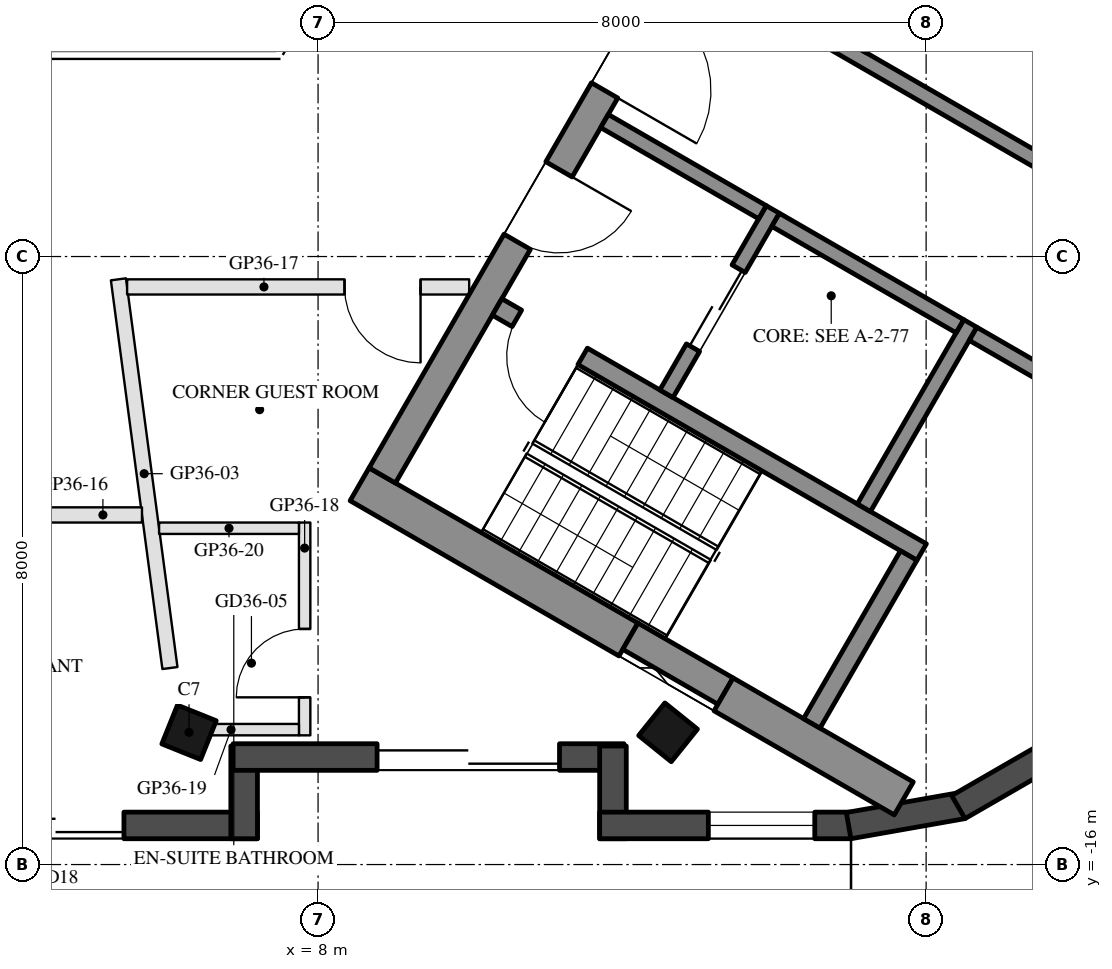
"""IFC4 building model, lengths in metres.
Left out: names, types, materials, properties, quantities, classifications, styles, units other than length and angle.
Written with IfcOpenShell. Run it as: python <this file> out.ifc"""

import sys

from ifc_helpers import new_model, si_unit, direction, frame, frame_2d, origin, origin_2d, place, context, subcontext, project, spatial, rectangle, hollow_rectangle, extrude, boolean, halfspace, element, fill, save


model = new_model("IFC4")
c1 = context("Model", 3, precision=1e-05, world=origin(), true_north=direction((0.0, 1.0)))
c2 = subcontext(c1, "Body", "Model", "MODEL_VIEW")
j1 = project(units=[si_unit("LENGTHUNIT", "METRE"), si_unit("PLANEANGLEUNIT", "RADIAN")], contexts=[c1])
p1 = place(None, origin())
s1 = spatial("IfcSite", under=j1, at=p1, CompositionType="ELEMENT")
p2 = place(p1, origin())
s2 = spatial("IfcBuilding", under=s1, at=p2, CompositionType="ELEMENT")
p3 = place(p2, frame((0.0, 0.0, 328.1)))
s3 = spatial("IfcBuildingStorey", under=s2, at=p3, CompositionType="ELEMENT", Elevation=328.1)
p4 = place(p3, frame((6.302, -14.26, 0.0), z_axis=(-0.060870463553, 0.151232178432, 0.986622326361), x_axis=(0.99813528898, 0.004713590867, 0.06085825296)))
e1 = element("IfcColumn", 1, at=p4, inside=s3, PredefinedType="COLUMN", context=c2, shape_type="SweptSolid", body=[
    boolean("DIFFERENCE", boolean("DIFFERENCE", extrude(hollow_rectangle(XDim=0.55, YDim=0.55, WallThickness=0.025, at=origin_2d()), origin(), (0.0, 0.0, 1.0), 3.75), halfspace(frame((0.0, 0.0, 0.034), z_axis=(0.0, 0.0, 1.0), x_axis=(1.0, 0.0, 0.0)), True)), halfspace(frame((0.0, 0.0, 3.735), z_axis=(0.0, 0.0, 1.0), x_axis=(1.0, 0.0, 0.0)), False)),
])
p5 = place(p3, frame((12.605, -14.26, 0.0), z_axis=(-0.121069901949, 0.150398600122, 0.981184151892), x_axis=(0.992601568988, 0.00920533993, 0.121067695767)))
e2 = element("IfcColumn", 2, at=p5, inside=s3, PredefinedType="COLUMN", context=c2, shape_type="SweptSolid", body=[
    boolean("DIFFERENCE", boolean("DIFFERENCE", extrude(hollow_rectangle(XDim=0.55, YDim=0.55, WallThickness=0.025, at=origin_2d()), origin(), (0.0, 0.0, 1.0), 3.771), halfspace(frame((0.0, 0.0, 0.04), z_axis=(0.0, 0.0, 1.0), x_axis=(1.0, 0.0, 0.0)), True)), halfspace(frame((0.0, 0.0, 3.753), z_axis=(0.0, 0.0, 1.0), x_axis=(1.0, 0.0, 0.0)), False)),
])
p6 = place(p3, frame((18.77, -10.837, 0.0), z_axis=(-0.190346159062, 0.109881938965, 0.975548204457), x_axis=(0.499994868029, 0.866028366632, 1.1507946e-05)))
e3 = element("IfcColumn", 3, at=p6, inside=s3, PredefinedType="COLUMN", context=c2, shape_type="SweptSolid", body=[
    boolean("DIFFERENCE", boolean("DIFFERENCE", extrude(hollow_rectangle(XDim=2.0, YDim=2.0, WallThickness=0.05, at=origin_2d()), origin(), (0.0, 0.0, 1.0), 3.793), halfspace(frame((0.0, 0.0, 0.113), z_axis=(0.0, 0.0, 1.0), x_axis=(1.0, 0.0, 0.0)), True)), halfspace(frame((0.0, 0.0, 3.744), z_axis=(0.0, 0.0, 1.0), x_axis=(1.0, 0.0, 0.0)), False)),
])
p7 = place(p3, frame((-0.9, -15.485, 0.0), z_axis=(0.0, 0.0, 1.0), x_axis=(1.0, 0.0, 0.0)))
e4 = element("IfcWall", 4, at=p7, inside=s3, PredefinedType="SOLIDWALL", context=c2, shape_type="SweptSolid", body=[
    extrude(rectangle(XDim=8.102, YDim=0.35, at=frame_2d((4.051, 0.0))), origin(), (0.0, 0.0, 1.0), 3.45),
])
p8 = place(p7, frame((4.546, 0.0, 0.0)))
e5 = element("IfcOpeningElement", 5, at=p8, cuts=e4, PredefinedType="OPENING", context=c2, shape_type="SweptSolid", body=[
    extrude(rectangle(XDim=1.8, YDim=2.4, at=frame_2d((0.9, 1.2))), frame((0.0, 0.185, 0.0), z_axis=(0.0, -1.0, 0.0), x_axis=(1.0, 0.0, 0.0)), (0.0, 0.0, 1.0), 0.37),
])
p9 = place(p7, frame((2.65, 0.0, 0.3)))
e6 = element("IfcOpeningElement", 6, at=p9, cuts=e4, PredefinedType="OPENING", context=c2, shape_type="SweptSolid", body=[
    extrude(rectangle(XDim=1.5, YDim=2.65, at=frame_2d((0.75, 1.325))), frame((0.0, 0.185, 0.0), z_axis=(0.0, -1.0, 0.0), x_axis=(1.0, 0.0, 0.0)), (0.0, 0.0, 1.0), 0.37),
])
p10 = place(p3, frame((7.027, -15.66, 0.0), z_axis=(0.0, 0.0, 1.0), x_axis=(0.0, 1.0, 0.0)))
e7 = element("IfcWall", 7, at=p10, inside=s3, PredefinedType="SOLIDWALL", context=c2, shape_type="SweptSolid", body=[
    extrude(rectangle(XDim=1.22, YDim=0.35, at=frame_2d((0.61, 0.0))), origin(), (0.0, 0.0, 1.0), 3.45),
])
p11 = place(p3, frame((6.882, -14.585, 0.0), z_axis=(0.0, 0.0, 1.0), x_axis=(1.0, 0.0, 0.0)))
e8 = element("IfcWall", 8, at=p11, inside=s3, PredefinedType="SOLIDWALL", context=c2, shape_type="SweptSolid", body=[
    extrude(rectangle(XDim=5.143, YDim=0.35, at=frame_2d((2.571, 0.0))), origin(), (0.0, 0.0, 1.0), 3.45),
])
p12 = place(p11, frame((1.894, 0.0, 0.0)))
e9 = element("IfcOpeningElement", 9, at=p12, cuts=e8, PredefinedType="OPENING", context=c2, shape_type="SweptSolid", body=[
    extrude(rectangle(XDim=2.4, YDim=2.4, at=frame_2d((1.2, 1.2))), frame((0.0, 0.185, 0.0), z_axis=(0.0, -1.0, 0.0), x_axis=(1.0, 0.0, 0.0)), (0.0, 0.0, 1.0), 0.37),
])
p13 = place(p3, frame((11.88, -14.44, 0.0), z_axis=(0.0, 0.0, 1.0), x_axis=(0.0, -1.0, 0.0)))
e10 = element("IfcWall", 10, at=p13, inside=s3, PredefinedType="SOLIDWALL", context=c2, shape_type="SweptSolid", body=[
    extrude(rectangle(XDim=1.22, YDim=0.35, at=frame_2d((0.61, 0.0))), origin(), (0.0, 0.0, 1.0), 3.45),
])
p14 = place(p3, frame((11.705, -15.485, 0.0), z_axis=(0.0, 0.0, 1.0), x_axis=(1.0, 0.0, 0.0)))
e11 = element("IfcWall", 11, at=p14, inside=s3, PredefinedType="SOLIDWALL", context=c2, shape_type="SweptSolid", body=[
    extrude(rectangle(XDim=3.306, YDim=0.35, at=frame_2d((1.653, 0.0))), origin(), (0.0, 0.0, 1.0), 3.45),
])
p15 = place(p14, frame((1.43, 0.0, 0.3)))
e12 = element("IfcOpeningElement", 12, at=p15, cuts=e11, PredefinedType="OPENING", context=c2, shape_type="SweptSolid", body=[
    extrude(rectangle(XDim=1.4, YDim=2.65, at=frame_2d((0.7, 1.325))), frame((0.0, 0.185, 0.0), z_axis=(0.0, -1.0, 0.0), x_axis=(1.0, 0.0, 0.0)), (0.0, 0.0, 1.0), 0.37),
])
for number, where, z_axis, x_axis in (
    (13, (14.98, -15.488, 0.0), (0.0, 0.0, 1.0), (0.985, 0.174, 0.0)),
    (14, (16.424, -15.244, 0.0), (0.0, 0.0, 1.0), (0.866, 0.5, 0.0)),
):
    element("IfcWall", number, at=place(p3, frame(where, z_axis=z_axis, x_axis=x_axis)), inside=s3, PredefinedType="SOLIDWALL", context=c2, shape_type="SweptSolid", body=[
        extrude(rectangle(XDim=1.524, YDim=0.35, at=frame_2d((0.762, 0.0))), origin(), (0.0, 0.0, 1.0), 3.45),
    ])
p16 = place(p3, frame((20.916, -5.257, 0.0), z_axis=(0.0, 0.0, 1.0), x_axis=(-0.500022310942, 0.866012522173, 0.0)))
e15 = element("IfcWall", 15, at=p16, inside=s3, PredefinedType="SOLIDWALL", context=c2, shape_type="SweptSolid", body=[
    extrude(rectangle(XDim=9.608, YDim=0.35, at=frame_2d((4.804, 0.0))), origin(), (0.0, 0.0, 1.0), 3.45),
])
p17 = place(p16, frame((0.45, 0.0, 0.3)))
e16 = element("IfcOpeningElement", 16, at=p17, cuts=e15, PredefinedType="OPENING", context=c2, shape_type="SweptSolid", body=[
    extrude(rectangle(XDim=1.4, YDim=2.65, at=frame_2d((0.7, 1.325))), frame((0.0, 0.185, 0.0), z_axis=(0.0, -1.0, 0.0), x_axis=(1.0, 0.0, 0.0)), (0.0, 0.0, 1.0), 0.37),
])
p18 = place(p16, frame((5.68, 0.0, 0.0)))
e17 = element("IfcOpeningElement", 17, at=p18, cuts=e15, PredefinedType="OPENING", context=c2, shape_type="SweptSolid", body=[
    extrude(rectangle(XDim=2.4, YDim=2.4, at=frame_2d((1.2, 1.2))), frame((0.0, 0.185, 0.0), z_axis=(0.0, -1.0, 0.0), x_axis=(1.0, 0.0, 0.0)), (0.0, 0.0, 1.0), 0.37),
])
p19 = place(p16, frame((3.492, 0.0, 0.3)))
e18 = element("IfcOpeningElement", 18, at=p19, cuts=e15, PredefinedType="OPENING", context=c2, shape_type="SweptSolid", body=[
    extrude(rectangle(XDim=1.8, YDim=2.65, at=frame_2d((0.9, 1.325))), frame((0.0, 0.185, 0.0), z_axis=(0.0, -1.0, 0.0), x_axis=(1.0, 0.0, 0.0)), (0.0, 0.0, 1.0), 0.37),
])
p20 = place(p3, frame((8.547, -10.997, 0.0), z_axis=(0.0, 0.0, 1.0), x_axis=(0.866031306094, -0.49998977676, 0.0)))
e19 = element("IfcWall", 19, at=p20, inside=s3, PredefinedType="SHEAR", context=c2, shape_type="SweptSolid", body=[
    extrude(rectangle(XDim=4.084, YDim=0.5, at=frame_2d((2.042, 0.0))), origin(), (0.0, 0.0, 1.0), 3.45),
])
p21 = place(p3, frame((12.109, -12.996, 0.0), z_axis=(0.0, 0.0, 1.0), x_axis=(0.865977303747, -0.500083302456, 0.0)))
e20 = element("IfcWall", 20, at=p21, inside=s3, PredefinedType="SHEAR", context=c2, shape_type="SweptSolid", body=[
    extrude(rectangle(XDim=1.445, YDim=0.4, at=frame_2d((0.722, 0.0))), origin(), (0.0, 0.0, 1.0), 3.45),
])
p22 = place(p3, frame((13.335, -13.761, 0.0), z_axis=(0.0, 0.0, 1.0), x_axis=(0.866034122891, -0.49998489776, 0.0)))
e21 = element("IfcWall", 21, at=p22, inside=s3, PredefinedType="SHEAR", context=c2, shape_type="SweptSolid", body=[
    extrude(rectangle(XDim=2.738, YDim=0.5, at=frame_2d((1.369, 0.0))), origin(), (0.0, 0.0, 1.0), 3.45),
])
p23 = place(p3, frame((8.845, -10.88, 0.0), z_axis=(0.0, 0.0, 1.0), x_axis=(0.500004234368, 0.866022959057, 0.0)))
e22 = element("IfcWall", 22, at=p23, inside=s3, PredefinedType="SHEAR", context=c2, shape_type="SweptSolid", body=[
    extrude(rectangle(XDim=10.0, YDim=0.4, at=frame_2d((5.0, 0.0))), origin(), (0.0, 0.0, 1.0), 3.45),
])
p24 = place(p23, frame((3.55, 0.0, 0.0)))
e23 = element("IfcOpeningElement", 23, at=p24, cuts=e22, PredefinedType="OPENING", context=c2, shape_type="SweptSolid", body=[
    extrude(rectangle(XDim=1.1, YDim=2.1, at=frame_2d((0.55, 1.05))), frame((0.0, 0.21, 0.0), z_axis=(0.0, -1.0, 0.0), x_axis=(1.0, 0.0, 0.0)), (0.0, 0.0, 1.0), 0.42),
])
p25 = place(p23, frame((5.85, 0.0, 0.0)))
e24 = element("IfcOpeningElement", 24, at=p25, cuts=e22, PredefinedType="OPENING", context=c2, shape_type="SweptSolid", body=[
    extrude(rectangle(XDim=1.4, YDim=2.1, at=frame_2d((0.7, 1.05))), frame((0.0, 0.21, 0.0), z_axis=(0.0, -1.0, 0.0), x_axis=(1.0, 0.0, 0.0)), (0.0, 0.0, 1.0), 0.42),
])
p26 = place(p3, frame((10.356, -8.664, 0.0), z_axis=(0.0, 0.0, 1.0), x_axis=(0.866028629588, -0.499994412703, 0.0)))
e25 = element("IfcWall", 25, at=p26, inside=s3, PredefinedType="SHEAR", context=c2, shape_type="SweptSolid", body=[
    extrude(rectangle(XDim=6.45, YDim=0.25, at=frame_2d((3.225, 0.0))), origin(), (0.0, 0.0, 1.0), 3.45),
])
p27 = place(p26, frame((0.3, 0.0, 0.0)))
e26 = element("IfcOpeningElement", 26, at=p27, cuts=e25, PredefinedType="OPENING", context=c2, shape_type="SweptSolid", body=[
    extrude(rectangle(XDim=1.0, YDim=2.1, at=frame_2d((0.5, 1.05))), frame((0.0, 0.135, 0.0), z_axis=(0.0, -1.0, 0.0), x_axis=(1.0, 0.0, 0.0)), (0.0, 0.0, 1.0), 0.27),
])
p28 = place(p3, frame((14.496, -14.143, 0.0), z_axis=(0.0, 0.0, 1.0), x_axis=(0.500062241894, 0.865989465428, 0.0)))
e27 = element("IfcWall", 27, at=p28, inside=s3, PredefinedType="SHEAR", context=c2, shape_type="SweptSolid", body=[
    extrude(rectangle(XDim=2.55, YDim=0.25, at=frame_2d((1.275, 0.0))), origin(), (0.0, 0.0, 1.0), 3.45),
])
p29 = place(p3, frame((15.181, -11.305, 0.0), z_axis=(0.0, 0.0, 1.0), x_axis=(0.49994636267, 0.866056369097, 0.0)))
e28 = element("IfcWall", 28, at=p29, inside=s3, PredefinedType="SHEAR", context=c2, shape_type="SweptSolid", body=[
    extrude(rectangle(XDim=2.8, YDim=0.2, at=frame_2d((1.4, 0.0))), origin(), (0.0, 0.0, 1.0), 3.45),
])
p30 = place(p3, frame((12.583, -9.805, 0.0), z_axis=(0.0, 0.0, 1.0), x_axis=(0.49994636267, 0.866056369097, 0.0)))
e29 = element("IfcWall", 29, at=p30, inside=s3, PredefinedType="SHEAR", context=c2, shape_type="SweptSolid", body=[
    extrude(rectangle(XDim=2.8, YDim=0.2, at=frame_2d((1.4, 0.0))), origin(), (0.0, 0.0, 1.0), 3.45),
])
p31 = place(p30, frame((0.7, 0.0, 0.0)))
e30 = element("IfcOpeningElement", 30, at=p31, cuts=e29, PredefinedType="OPENING", context=c2, shape_type="SweptSolid", body=[
    extrude(rectangle(XDim=1.2, YDim=2.1, at=frame_2d((0.6, 1.05))), frame((0.0, 0.11, 0.0), z_axis=(0.0, -1.0, 0.0), x_axis=(1.0, 0.0, 0.0)), (0.0, 0.0, 1.0), 0.22),
])
p32 = place(p3, frame((11.768, -6.217, 0.0), z_axis=(0.0, 0.0, 1.0), x_axis=(0.866050077142, -0.499957262057, 0.0)))
e31 = element("IfcWall", 31, at=p32, inside=s3, PredefinedType="SHEAR", context=c2, shape_type="SweptSolid", body=[
    extrude(rectangle(XDim=2.4, YDim=0.2, at=frame_2d((1.2, 0.0))), origin(), (0.0, 0.0, 1.0), 3.45),
])
p33 = place(p3, frame((14.02, -7.517, 0.0), z_axis=(0.0, 0.0, 1.0), x_axis=(0.866034573852, -0.49998411664, 0.0)))
e32 = element("IfcWall", 32, at=p33, inside=s3, PredefinedType="SHEAR", context=c2, shape_type="SweptSolid", body=[
    extrude(rectangle(XDim=2.8, YDim=0.2, at=frame_2d((1.4, 0.0))), origin(), (0.0, 0.0, 1.0), 3.45),
])
p34 = place(p3, frame((12.968, -4.138, 0.0), z_axis=(0.0, 0.0, 1.0), x_axis=(0.866022923061, -0.500004296715, 0.0)))
e33 = element("IfcWall", 33, at=p34, inside=s3, PredefinedType="SHEAR", context=c2, shape_type="SweptSolid", body=[
    extrude(rectangle(XDim=9.273, YDim=0.2, at=frame_2d((4.636, 0.0))), origin(), (0.0, 0.0, 1.0), 3.45),
])
p35 = place(p34, frame((0.62, 0.0, 0.0)))
e34 = element("IfcOpeningElement", 34, at=p35, cuts=e33, PredefinedType="OPENING", context=c2, shape_type="SweptSolid", body=[
    extrude(rectangle(XDim=1.1, YDim=2.1, at=frame_2d((0.55, 1.05))), frame((0.0, 0.11, 0.0), z_axis=(0.0, -1.0, 0.0), x_axis=(1.0, 0.0, 0.0)), (0.0, 0.0, 1.0), 0.22),
])
p36 = place(p34, frame((5.439, 0.0, 0.0)))
e35 = element("IfcOpeningElement", 35, at=p36, cuts=e33, PredefinedType="OPENING", context=c2, shape_type="SweptSolid", body=[
    extrude(rectangle(XDim=0.9, YDim=2.1, at=frame_2d((0.45, 1.05))), frame((0.0, 0.11, 0.0), z_axis=(0.0, -1.0, 0.0), x_axis=(1.0, 0.0, 0.0)), (0.0, 0.0, 1.0), 0.22),
])
p37 = place(p3, frame((16.618, -9.017, 0.0), z_axis=(0.0, 0.0, 1.0), x_axis=(0.866066400931, -0.499928984136, 0.0)))
e36 = element("IfcWall", 36, at=p37, inside=s3, PredefinedType="SHEAR", context=c2, shape_type="SweptSolid", body=[
    extrude(rectangle(XDim=1.774, YDim=0.2, at=frame_2d((0.887, 0.0))), origin(), (0.0, 0.0, 1.0), 3.45),
])
p38 = place(p3, frame((15.131, -5.272, 0.0), z_axis=(0.0, 0.0, 1.0), x_axis=(0.499972520799, 0.866041268327, 0.0)))
e37 = element("IfcWall", 37, at=p38, inside=s3, PredefinedType="SHEAR", context=c2, shape_type="SweptSolid", body=[
    extrude(rectangle(XDim=2.0, YDim=0.2, at=frame_2d((1.0, 0.0))), origin(), (0.0, 0.0, 1.0), 3.45),
])
p39 = place(p3, frame((6.051, -13.415, 0.0), z_axis=(0.0, 0.0, 1.0), x_axis=(-0.131363967537, 0.991334206024, 0.0)))
e38 = element("IfcWall", 38, at=p39, inside=s3, PredefinedType="PARTITIONING", context=c2, shape_type="SweptSolid", body=[
    extrude(rectangle(XDim=5.159, YDim=0.2, at=frame_2d((2.58, 0.0))), origin(), (0.0, 0.0, 1.0), 3.05),
])
p40 = place(p3, frame((5.683, -11.4, 0.0), z_axis=(0.0, 0.0, 1.0), x_axis=(-1.0, 0.0, 0.0)))
e39 = element("IfcWall", 39, at=p40, inside=s3, PredefinedType="PARTITIONING", context=c2, shape_type="SweptSolid", body=[
    extrude(rectangle(XDim=4.283, YDim=0.2, at=frame_2d((2.142, 0.0))), origin(), (0.0, 0.0, 1.0), 3.05),
])
p41 = place(p40, frame((1.642, 0.0, 0.0)))
e40 = element("IfcOpeningElement", 40, at=p41, cuts=e39, PredefinedType="OPENING", context=c2, shape_type="SweptSolid", body=[
    extrude(rectangle(XDim=1.0, YDim=2.1, at=frame_2d((0.5, 1.05))), frame((0.0, 0.11, 0.0), z_axis=(0.0, -1.0, 0.0), x_axis=(1.0, 0.0, 0.0)), (0.0, 0.0, 1.0), 0.22),
])
p42 = place(p3, frame((9.988, -8.4, 0.0), z_axis=(0.0, 0.0, 1.0), x_axis=(-1.0, 0.0, 0.0)))
e41 = element("IfcWall", 41, at=p42, inside=s3, PredefinedType="PARTITIONING", context=c2, shape_type="SweptSolid", body=[
    extrude(rectangle(XDim=4.501, YDim=0.2, at=frame_2d((2.25, 0.0))), origin(), (0.0, 0.0, 1.0), 3.05),
])
p43 = place(p42, frame((0.64, 0.0, 0.0)))
e42 = element("IfcOpeningElement", 42, at=p43, cuts=e41, PredefinedType="OPENING", context=c2, shape_type="SweptSolid", body=[
    extrude(rectangle(XDim=1.0, YDim=2.1, at=frame_2d((0.5, 1.05))), frame((0.0, 0.11, 0.0), z_axis=(0.0, -1.0, 0.0), x_axis=(1.0, 0.0, 0.0)), (0.0, 0.0, 1.0), 0.22),
])
p44 = place(p3, frame((7.823, -14.3, 0.0), z_axis=(0.0, 0.0, 1.0), x_axis=(0.0, 1.0, 0.0)))
e43 = element("IfcWall", 43, at=p44, inside=s3, PredefinedType="PARTITIONING", context=c2, shape_type="SweptSolid", body=[
    extrude(rectangle(XDim=2.8, YDim=0.15, at=frame_2d((1.4, 0.0))), origin(), (0.0, 0.0, 1.0), 3.05),
])
p45 = place(p44, frame((0.5, 0.0, 0.0)))
e44 = element("IfcOpeningElement", 44, at=p45, cuts=e43, PredefinedType="OPENING", context=c2, shape_type="SweptSolid", body=[
    extrude(rectangle(XDim=0.9, YDim=2.1, at=frame_2d((0.45, 1.05))), frame((0.0, 0.085, 0.0), z_axis=(0.0, -1.0, 0.0), x_axis=(1.0, 0.0, 0.0)), (0.0, 0.0, 1.0), 0.17),
])
p46 = place(p3, frame((6.26, -14.225, 0.0), z_axis=(0.0, 0.0, 1.0), x_axis=(1.0, 0.0, 0.0)))
e45 = element("IfcWall", 45, at=p46, inside=s3, PredefinedType="PARTITIONING", context=c2, shape_type="SweptSolid", body=[
    extrude(rectangle(XDim=1.489, YDim=0.15, at=frame_2d((0.744, 0.0))), origin(), (0.0, 0.0, 1.0), 3.45),
])
p47 = place(p3, frame((5.908, -11.575, 0.0), z_axis=(0.0, 0.0, 1.0), x_axis=(1.0, 0.0, 0.0)))
e46 = element("IfcWall", 46, at=p47, inside=s3, PredefinedType="PARTITIONING", context=c2, shape_type="SweptSolid", body=[
    extrude(rectangle(XDim=1.84, YDim=0.15, at=frame_2d((0.92, 0.0))), origin(), (0.0, 0.0, 1.0), 3.05),
])
p48 = place(p8, frame((1.8, 0.0, 0.0), z_axis=(0.0, 0.0, 1.0), x_axis=(-1.0, 0.0, 0.0)))
e47 = element("IfcDoor", 47, at=p48, inside=s3, OperationType="SLIDING_TO_LEFT", PredefinedType="DOOR", context=c2, shape_type="SweptSolid", body=[
    extrude(rectangle(XDim=1.8, YDim=2.4, at=frame_2d((0.9, 1.2))), frame((0.0, 0.025, 0.0), z_axis=(0.0, -1.0, 0.0), x_axis=(1.0, 0.0, 0.0)), (0.0, 0.0, 1.0), 0.05),
])
fill(e5, e47)
p49 = place(p12, frame((2.4, 0.0, 0.0), z_axis=(0.0, 0.0, 1.0), x_axis=(-1.0, 0.0, 0.0)))
e48 = element("IfcDoor", 48, at=p49, inside=s3, OperationType="SLIDING_TO_LEFT", PredefinedType="DOOR", context=c2, shape_type="SweptSolid", body=[
    extrude(rectangle(XDim=2.4, YDim=2.4, at=frame_2d((1.2, 1.2))), frame((0.0, 0.025, 0.0), z_axis=(0.0, -1.0, 0.0), x_axis=(1.0, 0.0, 0.0)), (0.0, 0.0, 1.0), 0.05),
])
fill(e9, e48)
p50 = place(p15, origin())
e49 = element("IfcWindow", 49, at=p50, inside=s3, PartitioningType="SINGLE_PANEL", PredefinedType="WINDOW", context=c2, shape_type="SweptSolid", body=[
    extrude(rectangle(XDim=1.4, YDim=2.65, at=frame_2d((0.7, 1.325))), frame((0.0, 0.03, 0.0), z_axis=(0.0, -1.0, 0.0), x_axis=(1.0, 0.0, 0.0)), (0.0, 0.0, 1.0), 0.06),
])
fill(e12, e49)
p51 = place(p31, origin())
e50 = element("IfcDoor", 50, at=p51, inside=s3, OperationType="DOUBLE_DOOR_SLIDING", PredefinedType="DOOR", context=c2, shape_type="SweptSolid", body=[
    extrude(rectangle(XDim=1.2, YDim=2.1, at=frame_2d((0.6, 1.05))), frame((0.0, 0.025, 0.0), z_axis=(0.0, -1.0, 0.0), x_axis=(1.0, 0.0, 0.0)), (0.0, 0.0, 1.0), 0.05),
])
fill(e30, e50)
p52 = place(p24, frame((1.1, 0.0, 0.0), z_axis=(0.0, 0.0, 1.0), x_axis=(-1.0, 0.0, 0.0)))
e51 = element("IfcDoor", 51, at=p52, inside=s3, OperationType="SINGLE_SWING_LEFT", PredefinedType="DOOR", context=c2, shape_type="SweptSolid", body=[
    extrude(rectangle(XDim=1.1, YDim=2.1, at=frame_2d((0.55, 1.05))), frame((0.0, 0.025, 0.0), z_axis=(0.0, -1.0, 0.0), x_axis=(1.0, 0.0, 0.0)), (0.0, 0.0, 1.0), 0.05),
])
fill(e23, e51)
p53 = place(p25, frame((1.4, 0.0, 0.0), z_axis=(0.0, 0.0, 1.0), x_axis=(-1.0, 0.0, 0.0)))
e52 = element("IfcDoor", 52, at=p53, inside=s3, OperationType="DOUBLE_DOOR_SINGLE_SWING", PredefinedType="DOOR", context=c2, shape_type="SweptSolid", body=[
    extrude(rectangle(XDim=1.4, YDim=2.1, at=frame_2d((0.7, 1.05))), frame((0.0, 0.025, 0.0), z_axis=(0.0, -1.0, 0.0), x_axis=(1.0, 0.0, 0.0)), (0.0, 0.0, 1.0), 0.05),
])
fill(e24, e52)
p54 = place(p27, frame((1.0, 0.0, 0.0), z_axis=(0.0, 0.0, 1.0), x_axis=(-1.0, 0.0, 0.0)))
e53 = element("IfcDoor", 53, at=p54, inside=s3, OperationType="SINGLE_SWING_LEFT", PredefinedType="DOOR", context=c2, shape_type="SweptSolid", body=[
    extrude(rectangle(XDim=1.0, YDim=2.1, at=frame_2d((0.5, 1.05))), frame((0.0, 0.025, 0.0), z_axis=(0.0, -1.0, 0.0), x_axis=(1.0, 0.0, 0.0)), (0.0, 0.0, 1.0), 0.05),
])
fill(e26, e53)
p55 = place(p45, origin())
e54 = element("IfcDoor", 54, at=p55, inside=s3, OperationType="SINGLE_SWING_LEFT", PredefinedType="DOOR", context=c2, shape_type="SweptSolid", body=[
    extrude(rectangle(XDim=0.9, YDim=2.1, at=frame_2d((0.45, 1.05))), frame((0.0, 0.025, 0.0), z_axis=(0.0, -1.0, 0.0), x_axis=(1.0, 0.0, 0.0)), (0.0, 0.0, 1.0), 0.05),
])
fill(e44, e54)
p56 = place(p43, origin())
e55 = element("IfcDoor", 55, at=p56, inside=s3, OperationType="SINGLE_SWING_LEFT", PredefinedType="DOOR", context=c2, shape_type="SweptSolid", body=[
    extrude(rectangle(XDim=1.0, YDim=2.1, at=frame_2d((0.5, 1.05))), frame((0.0, 0.025, 0.0), z_axis=(0.0, -1.0, 0.0), x_axis=(1.0, 0.0, 0.0)), (0.0, 0.0, 1.0), 0.05),
])
fill(e42, e55)
save(model, sys.argv[1])
